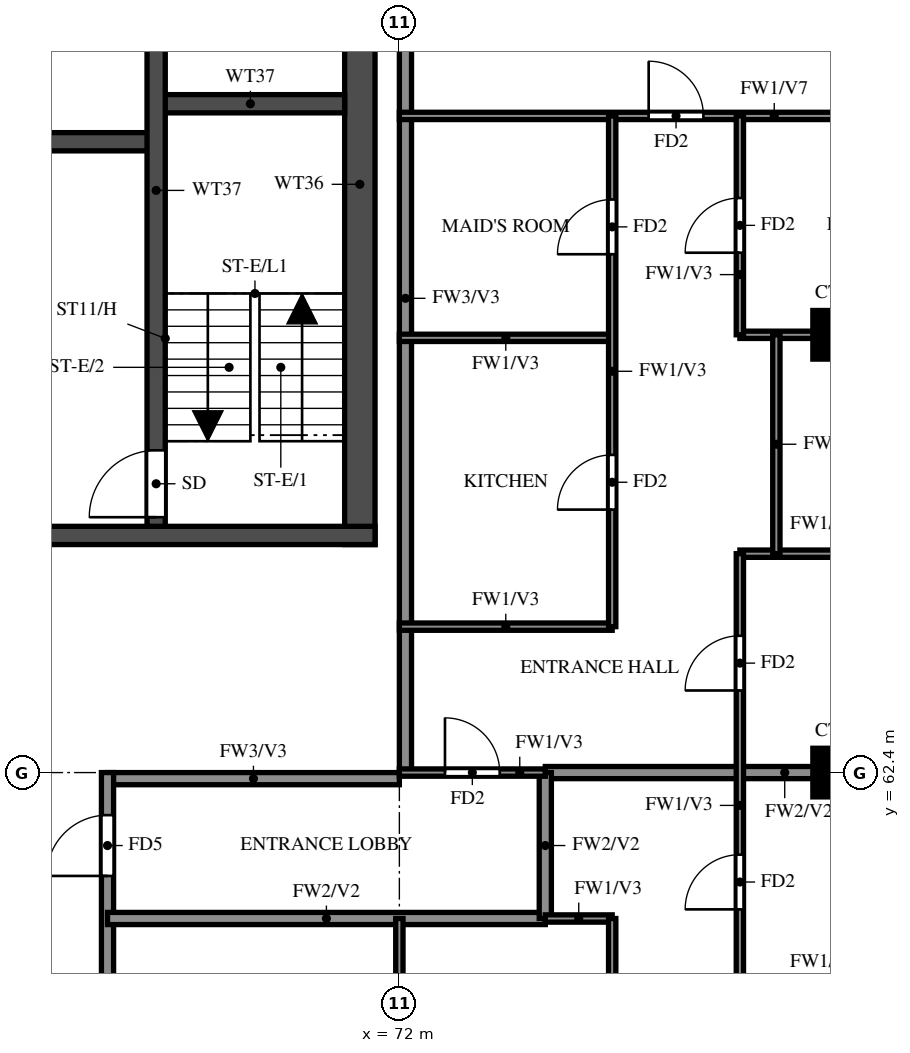
"""IFC4 building model, lengths in metres.
Left out: names, types, materials, properties, quantities, classifications, styles, units other than length and angle.
Written with IfcOpenShell. Run it as: python <this file> out.ifc"""

import sys

from ifc_helpers import new_model, si_unit, direction, frame, frame_2d, origin, origin_2d, place, context, subcontext, project, spatial, rectangle, extrude, source, transform, mapped, element, fill, save


model = new_model("IFC4")
c1 = context("Model", 3, precision=1e-05, world=origin(), true_north=direction((0.0, 1.0)))
c2 = subcontext(c1, "Body", "Model", "MODEL_VIEW")
j1 = project(units=[si_unit("LENGTHUNIT", "METRE"), si_unit("PLANEANGLEUNIT", "RADIAN")], contexts=[c1])
p1 = place(None, origin())
s1 = spatial("IfcSite", under=j1, at=p1, CompositionType="ELEMENT")
p2 = place(p1, origin())
s2 = spatial("IfcBuilding", under=s1, at=p2, CompositionType="ELEMENT")
p3 = place(p2, frame((0.0, 0.0, 239.5)))
s3 = spatial("IfcBuildingStorey", under=s2, at=p3, CompositionType="ELEMENT", Elevation=239.5)
m1 = source(origin(), c2, "Body", "SweptSolid", [
    extrude(rectangle(XDim=0.8, YDim=0.8, at=origin_2d()), origin(), (0.0, 0.0, 1.0), 3.22),
])
for number, where, z_axis, x_axis in (
    (1, (79.2, 62.4, 0.0), (0.0, 0.0, 1.0), (1.0, 0.0, 0.0)),
    (2, (79.2, 69.6, 0.0), (0.0, 0.0, 1.0), (1.0, 0.0, 0.0)),
):
    element("IfcColumn", number, at=place(p3, frame(where, z_axis=z_axis, x_axis=x_axis)), inside=s3, PredefinedType="COLUMN", context=c2, shape_type="MappedRepresentation", body=[
        mapped(m1, transform((0.0, 0.0, 0.0))),
    ])
p4 = place(p3, frame((71.35, 66.15, 0.0), z_axis=(0.0, 0.0, 1.0), x_axis=(0.0, 1.0, 0.0)))
e3 = element("IfcWall", 3, at=p4, inside=s3, PredefinedType="SHEAR", context=c2, shape_type="SweptSolid", body=[
    extrude(rectangle(XDim=11.85, YDim=0.5, at=frame_2d((5.925, 0.0))), origin(), (0.0, 0.0, 1.0), 3.22),
])
p5 = place(p3, frame((29.2, 66.3, 0.0), z_axis=(0.0, 0.0, 1.0), x_axis=(1.0, 0.0, 0.0)))
e4 = element("IfcWall", 4, at=p5, inside=s3, PredefinedType="SHEAR", context=c2, shape_type="SweptSolid", body=[
    extrude(rectangle(XDim=42.4, YDim=0.3, at=frame_2d((21.2, 0.0))), origin(), (0.0, 0.0, 1.0), 3.22),
])
p6 = place(p5, frame((1.425, 0.0, 0.0)))
e5 = element("IfcOpeningElement", 5, at=p6, cuts=e4, PredefinedType="OPENING", context=c2, shape_type="SweptSolid", body=[
    extrude(rectangle(XDim=1.1, YDim=2.1, at=frame_2d((0.55, 1.05))), frame((0.0, 0.16, 0.0), z_axis=(0.0, -1.0, 0.0), x_axis=(1.0, 0.0, 0.0)), (0.0, 0.0, 1.0), 0.32),
])
p7 = place(p5, frame((4.2, 0.0, 0.0)))
e6 = element("IfcOpeningElement", 6, at=p7, cuts=e4, PredefinedType="OPENING", context=c2, shape_type="SweptSolid", body=[
    extrude(rectangle(XDim=1.8, YDim=2.1, at=frame_2d((0.9, 1.05))), frame((0.0, 0.16, 0.0), z_axis=(0.0, -1.0, 0.0), x_axis=(1.0, 0.0, 0.0)), (0.0, 0.0, 1.0), 0.32),
])
p8 = place(p3, frame((32.8, 72.775, 0.0), z_axis=(0.0, 0.0, 1.0), x_axis=(1.0, 0.0, 0.0)))
e7 = element("IfcWall", 7, at=p8, inside=s3, PredefinedType="SHEAR", context=c2, shape_type="SweptSolid", body=[
    extrude(rectangle(XDim=35.2, YDim=0.3, at=frame_2d((17.6, 0.0))), origin(), (0.0, 0.0, 1.0), 3.22),
])
p9 = place(p8, frame((19.8, 0.0, 0.0)))
e8 = element("IfcOpeningElement", 8, at=p9, cuts=e7, PredefinedType="OPENING", context=c2, shape_type="SweptSolid", body=[
    extrude(rectangle(XDim=1.1, YDim=2.1, at=frame_2d((0.55, 1.05))), frame((0.0, 0.16, 0.0), z_axis=(0.0, -1.0, 0.0), x_axis=(1.0, 0.0, 0.0)), (0.0, 0.0, 1.0), 0.32),
])
p10 = place(p8, frame((27.725, 0.0, 0.0)))
e9 = element("IfcOpeningElement", 9, at=p10, cuts=e7, PredefinedType="OPENING", context=c2, shape_type="SweptSolid", body=[
    extrude(rectangle(XDim=1.1, YDim=2.1, at=frame_2d((0.55, 1.05))), frame((0.0, 0.16, 0.0), z_axis=(0.0, -1.0, 0.0), x_axis=(1.0, 0.0, 0.0)), (0.0, 0.0, 1.0), 0.32),
])
p11 = place(p8, frame((30.325, 0.0, 0.0)))
e10 = element("IfcOpeningElement", 10, at=p11, cuts=e7, PredefinedType="OPENING", context=c2, shape_type="SweptSolid", body=[
    extrude(rectangle(XDim=1.1, YDim=2.1, at=frame_2d((0.55, 1.05))), frame((0.0, 0.16, 0.0), z_axis=(0.0, -1.0, 0.0), x_axis=(1.0, 0.0, 0.0)), (0.0, 0.0, 1.0), 0.32),
])
p12 = place(p8, frame((3.825, 0.0, 0.0)))
e11 = element("IfcOpeningElement", 11, at=p12, cuts=e7, PredefinedType="OPENING", context=c2, shape_type="SweptSolid", body=[
    extrude(rectangle(XDim=1.1, YDim=2.1, at=frame_2d((0.55, 1.05))), frame((0.0, 0.16, 0.0), z_axis=(0.0, -1.0, 0.0), x_axis=(1.0, 0.0, 0.0)), (0.0, 0.0, 1.0), 0.32),
])
p13 = place(p8, frame((6.575, 0.0, 0.0)))
e12 = element("IfcOpeningElement", 12, at=p13, cuts=e7, PredefinedType="OPENING", context=c2, shape_type="SweptSolid", body=[
    extrude(rectangle(XDim=1.1, YDim=2.1, at=frame_2d((0.55, 1.05))), frame((0.0, 0.16, 0.0), z_axis=(0.0, -1.0, 0.0), x_axis=(1.0, 0.0, 0.0)), (0.0, 0.0, 1.0), 0.32),
])
p14 = place(p8, frame((9.325, 0.0, 0.0)))
e13 = element("IfcOpeningElement", 13, at=p14, cuts=e7, PredefinedType="OPENING", context=c2, shape_type="SweptSolid", body=[
    extrude(rectangle(XDim=1.1, YDim=2.1, at=frame_2d((0.55, 1.05))), frame((0.0, 0.16, 0.0), z_axis=(0.0, -1.0, 0.0), x_axis=(1.0, 0.0, 0.0)), (0.0, 0.0, 1.0), 0.32),
])
p15 = place(p8, frame((12.075, 0.0, 0.0)))
e14 = element("IfcOpeningElement", 14, at=p15, cuts=e7, PredefinedType="OPENING", context=c2, shape_type="SweptSolid", body=[
    extrude(rectangle(XDim=1.1, YDim=2.1, at=frame_2d((0.55, 1.05))), frame((0.0, 0.16, 0.0), z_axis=(0.0, -1.0, 0.0), x_axis=(1.0, 0.0, 0.0)), (0.0, 0.0, 1.0), 0.32),
])
p16 = place(p8, frame((14.825, 0.0, 0.0)))
e15 = element("IfcOpeningElement", 15, at=p16, cuts=e7, PredefinedType="OPENING", context=c2, shape_type="SweptSolid", body=[
    extrude(rectangle(XDim=1.1, YDim=2.1, at=frame_2d((0.55, 1.05))), frame((0.0, 0.16, 0.0), z_axis=(0.0, -1.0, 0.0), x_axis=(1.0, 0.0, 0.0)), (0.0, 0.0, 1.0), 0.32),
])
p17 = place(p8, frame((17.575, 0.0, 0.0)))
e16 = element("IfcOpeningElement", 16, at=p17, cuts=e7, PredefinedType="OPENING", context=c2, shape_type="SweptSolid", body=[
    extrude(rectangle(XDim=1.1, YDim=2.1, at=frame_2d((0.55, 1.05))), frame((0.0, 0.16, 0.0), z_axis=(0.0, -1.0, 0.0), x_axis=(1.0, 0.0, 0.0)), (0.0, 0.0, 1.0), 0.32),
])
p18 = place(p8, frame((0.95, 0.0, 0.0)))
e17 = element("IfcOpeningElement", 17, at=p18, cuts=e7, PredefinedType="OPENING", context=c2, shape_type="SweptSolid", body=[
    extrude(rectangle(XDim=1.1, YDim=2.1, at=frame_2d((0.55, 1.05))), frame((0.0, 0.16, 0.0), z_axis=(0.0, -1.0, 0.0), x_axis=(1.0, 0.0, 0.0)), (0.0, 0.0, 1.0), 0.32),
])
p19 = place(p3, frame((68.0, 73.4, 0.0), z_axis=(0.0, 0.0, 1.0), x_axis=(1.0, 0.0, 0.0)))
e18 = element("IfcWall", 18, at=p19, inside=s3, PredefinedType="SHEAR", context=c2, shape_type="SweptSolid", body=[
    extrude(rectangle(XDim=3.1, YDim=0.3, at=frame_2d((1.55, 0.0))), origin(), (0.0, 0.0, 1.0), 3.22),
])
p20 = place(p3, frame((68.0, 66.45, 0.0), z_axis=(0.0, 0.0, 1.0), x_axis=(0.0, 1.0, 0.0)))
e19 = element("IfcWall", 19, at=p20, inside=s3, PredefinedType="SHEAR", context=c2, shape_type="SweptSolid", body=[
    extrude(rectangle(XDim=11.05, YDim=0.3, at=frame_2d((5.525, 0.0))), origin(), (0.0, 0.0, 1.0), 3.22),
])
p21 = place(p20, frame((0.15, 0.0, 0.0)))
e20 = element("IfcOpeningElement", 20, at=p21, cuts=e19, PredefinedType="OPENING", context=c2, shape_type="SweptSolid", body=[
    extrude(rectangle(XDim=1.1, YDim=2.1, at=frame_2d((0.55, 1.05))), frame((0.0, 0.16, 0.0), z_axis=(0.0, -1.0, 0.0), x_axis=(1.0, 0.0, 0.0)), (0.0, 0.0, 1.0), 0.32),
])
p22 = place(p3, frame((67.2, 62.3, 0.0), z_axis=(0.0, 0.0, 1.0), x_axis=(1.0, 0.0, 0.0)))
e21 = element("IfcWall", 21, at=p22, inside=s3, PredefinedType="SOLIDWALL", context=c2, shape_type="SweptSolid", body=[
    extrude(rectangle(XDim=4.8, YDim=0.2, at=frame_2d((2.4, 0.0))), origin(), (0.0, 0.0, 1.0), 3.22),
])
p23 = place(p3, frame((67.2, 45.6, 0.0), z_axis=(0.0, 0.0, 1.0), x_axis=(0.0, 1.0, 0.0)))
e22 = element("IfcWall", 22, at=p23, inside=s3, PredefinedType="SOLIDWALL", context=c2, shape_type="SweptSolid", body=[
    extrude(rectangle(XDim=16.8, YDim=0.2, at=frame_2d((8.4, 0.0))), origin(), (0.0, 0.0, 1.0), 3.22),
])
p24 = place(p23, frame((6.7, 0.0, 0.0)))
e23 = element("IfcOpeningElement", 23, at=p24, cuts=e22, PredefinedType="OPENING", context=c2, shape_type="SweptSolid", body=[
    extrude(rectangle(XDim=1.0, YDim=2.1, at=frame_2d((0.5, 1.05))), frame((0.0, 0.11, 0.0), z_axis=(0.0, -1.0, 0.0), x_axis=(1.0, 0.0, 0.0)), (0.0, 0.0, 1.0), 0.22),
])
p25 = place(p23, frame((15.1, 0.0, 0.0)))
e24 = element("IfcOpeningElement", 24, at=p25, cuts=e22, PredefinedType="OPENING", context=c2, shape_type="SweptSolid", body=[
    extrude(rectangle(XDim=1.0, YDim=2.1, at=frame_2d((0.5, 1.05))), frame((0.0, 0.11, 0.0), z_axis=(0.0, -1.0, 0.0), x_axis=(1.0, 0.0, 0.0)), (0.0, 0.0, 1.0), 0.22),
])
p26 = place(p23, frame((0.7, 0.0, 0.0)))
e25 = element("IfcOpeningElement", 25, at=p26, cuts=e22, PredefinedType="OPENING", context=c2, shape_type="SweptSolid", body=[
    extrude(rectangle(XDim=1.0, YDim=2.1, at=frame_2d((0.5, 1.05))), frame((0.0, 0.11, 0.0), z_axis=(0.0, -1.0, 0.0), x_axis=(1.0, 0.0, 0.0)), (0.0, 0.0, 1.0), 0.22),
])
p27 = place(p3, frame((72.1, 62.4, 0.0), z_axis=(0.0, 0.0, 1.0), x_axis=(0.0, 1.0, 0.0)))
e26 = element("IfcWall", 26, at=p27, inside=s3, PredefinedType="SOLIDWALL", context=c2, shape_type="SweptSolid", body=[
    extrude(rectangle(XDim=15.6, YDim=0.2, at=frame_2d((7.8, 0.0))), origin(), (0.0, 0.0, 1.0), 3.22),
])
p28 = place(p3, frame((67.2, 60.0, 0.0), z_axis=(0.0, 0.0, 1.0), x_axis=(1.0, 0.0, 0.0)))
e27 = element("IfcWall", 27, at=p28, inside=s3, PredefinedType="SOLIDWALL", context=c2, shape_type="SweptSolid", body=[
    extrude(rectangle(XDim=7.2, YDim=0.2, at=frame_2d((3.6, 0.0))), origin(), (0.0, 0.0, 1.0), 3.22),
])
p29 = place(p3, frame((74.4, 62.4, 0.0), z_axis=(0.0, 0.0, 1.0), x_axis=(1.0, 0.0, 0.0)))
e28 = element("IfcWall", 28, at=p29, inside=s3, PredefinedType="SOLIDWALL", context=c2, shape_type="SweptSolid", body=[
    extrude(rectangle(XDim=7.875, YDim=0.2, at=frame_2d((3.938, 0.0))), origin(), (0.0, 0.0, 1.0), 3.22),
])
p30 = place(p3, frame((74.4, 60.0, 0.0), z_axis=(0.0, 0.0, 1.0), x_axis=(0.0, 1.0, 0.0)))
e29 = element("IfcWall", 29, at=p30, inside=s3, PredefinedType="SOLIDWALL", context=c2, shape_type="SweptSolid", body=[
    extrude(rectangle(XDim=2.4, YDim=0.2, at=frame_2d((1.2, 0.0))), origin(), (0.0, 0.0, 1.0), 3.22),
])
p31 = place(p3, frame((74.4, 60.0, 0.0), z_axis=(0.0, 0.0, 1.0), x_axis=(1.0, 0.0, 0.0)))
e30 = element("IfcWall", 30, at=p31, inside=s3, PredefinedType="PARTITIONING", context=c2, shape_type="SweptSolid", body=[
    extrude(rectangle(XDim=1.1, YDim=0.12, at=frame_2d((0.55, 0.0))), origin(), (0.0, 0.0, 1.0), 3.22),
])
p32 = place(p3, frame((72.0, 62.4, 0.0), z_axis=(0.0, 0.0, 1.0), x_axis=(1.0, 0.0, 0.0)))
e31 = element("IfcWall", 31, at=p32, inside=s3, PredefinedType="PARTITIONING", context=c2, shape_type="SweptSolid", body=[
    extrude(rectangle(XDim=2.4, YDim=0.12, at=frame_2d((1.2, 0.0))), origin(), (0.0, 0.0, 1.0), 3.22),
])
p33 = place(p32, frame((0.75, 0.0, 0.0)))
e32 = element("IfcOpeningElement", 32, at=p33, cuts=e31, PredefinedType="OPENING", context=c2, shape_type="SweptSolid", body=[
    extrude(rectangle(XDim=0.9, YDim=2.1, at=frame_2d((0.45, 1.05))), frame((0.0, 0.07, 0.0), z_axis=(0.0, -1.0, 0.0), x_axis=(1.0, 0.0, 0.0)), (0.0, 0.0, 1.0), 0.14),
])
p34 = place(p3, frame((72.0, 64.8, 0.0), z_axis=(0.0, 0.0, 1.0), x_axis=(1.0, 0.0, 0.0)))
e33 = element("IfcWall", 33, at=p34, inside=s3, PredefinedType="PARTITIONING", context=c2, shape_type="SweptSolid", body=[
    extrude(rectangle(XDim=3.5, YDim=0.12, at=frame_2d((1.75, 0.0))), origin(), (0.0, 0.0, 1.0), 3.22),
])
p35 = place(p3, frame((77.6, 66.0, 0.0), z_axis=(0.0, 0.0, 1.0), x_axis=(1.0, 0.0, 0.0)))
e34 = element("IfcWall", 34, at=p35, inside=s3, PredefinedType="PARTITIONING", context=c2, shape_type="SweptSolid", body=[
    extrude(rectangle(XDim=4.675, YDim=0.12, at=frame_2d((2.337, 0.0))), origin(), (0.0, 0.0, 1.0), 2.32),
])
p36 = place(p35, frame((2.238, 0.0, 0.0)))
e35 = element("IfcOpeningElement", 35, at=p36, cuts=e34, PredefinedType="OPENING", context=c2, shape_type="SweptSolid", body=[
    extrude(rectangle(XDim=0.8, YDim=2.1, at=frame_2d((0.4, 1.05))), frame((0.0, 0.07, 0.0), z_axis=(0.0, -1.0, 0.0), x_axis=(1.0, 0.0, 0.0)), (0.0, 0.0, 1.0), 0.14),
])
p37 = place(p3, frame((72.0, 69.55, 0.0), z_axis=(0.0, 0.0, 1.0), x_axis=(1.0, 0.0, 0.0)))
e36 = element("IfcWall", 36, at=p37, inside=s3, PredefinedType="PARTITIONING", context=c2, shape_type="SweptSolid", body=[
    extrude(rectangle(XDim=3.5, YDim=0.12, at=frame_2d((1.75, 0.0))), origin(), (0.0, 0.0, 1.0), 3.22),
])
p38 = place(p3, frame((77.6, 69.6, 0.0), z_axis=(0.0, 0.0, 1.0), x_axis=(1.0, 0.0, 0.0)))
e37 = element("IfcWall", 37, at=p38, inside=s3, PredefinedType="PARTITIONING", context=c2, shape_type="SweptSolid", body=[
    extrude(rectangle(XDim=4.675, YDim=0.12, at=frame_2d((2.337, 0.0))), origin(), (0.0, 0.0, 1.0), 3.22),
])
p39 = place(p3, frame((72.0, 73.2, 0.0), z_axis=(0.0, 0.0, 1.0), x_axis=(1.0, 0.0, 0.0)))
e38 = element("IfcWall", 38, at=p39, inside=s3, PredefinedType="PARTITIONING", context=c2, shape_type="SweptSolid", body=[
    extrude(rectangle(XDim=10.275, YDim=0.12, at=frame_2d((5.137, 0.0))), origin(), (0.0, 0.0, 1.0), 2.32),
])
p40 = place(p39, frame((4.1, 0.0, 0.0)))
e39 = element("IfcOpeningElement", 39, at=p40, cuts=e38, PredefinedType="OPENING", context=c2, shape_type="SweptSolid", body=[
    extrude(rectangle(XDim=0.9, YDim=2.1, at=frame_2d((0.45, 1.05))), frame((0.0, 0.07, 0.0), z_axis=(0.0, -1.0, 0.0), x_axis=(1.0, 0.0, 0.0)), (0.0, 0.0, 1.0), 0.14),
])
p41 = place(p3, frame((72.0, 54.0, 0.0), z_axis=(0.0, 0.0, 1.0), x_axis=(0.0, 1.0, 0.0)))
e40 = element("IfcWall", 40, at=p41, inside=s3, PredefinedType="PARTITIONING", context=c2, shape_type="SweptSolid", body=[
    extrude(rectangle(XDim=6.0, YDim=0.12, at=frame_2d((3.0, 0.0))), origin(), (0.0, 0.0, 1.0), 3.22),
])
p42 = place(p3, frame((75.5, 54.0, 0.0), z_axis=(0.0, 0.0, 1.0), x_axis=(0.0, 1.0, 0.0)))
e41 = element("IfcWall", 41, at=p42, inside=s3, PredefinedType="PARTITIONING", context=c2, shape_type="SweptSolid", body=[
    extrude(rectangle(XDim=6.0, YDim=0.12, at=frame_2d((3.0, 0.0))), origin(), (0.0, 0.0, 1.0), 3.22),
])
p43 = place(p42, frame((3.7, 0.0, 0.0)))
e42 = element("IfcOpeningElement", 42, at=p43, cuts=e41, PredefinedType="OPENING", context=c2, shape_type="SweptSolid", body=[
    extrude(rectangle(XDim=0.8, YDim=2.1, at=frame_2d((0.4, 1.05))), frame((0.0, 0.07, 0.0), z_axis=(0.0, -1.0, 0.0), x_axis=(1.0, 0.0, 0.0)), (0.0, 0.0, 1.0), 0.14),
])
p44 = place(p3, frame((75.5, 64.8, 0.0), z_axis=(0.0, 0.0, 1.0), x_axis=(0.0, 1.0, 0.0)))
e43 = element("IfcWall", 43, at=p44, inside=s3, PredefinedType="PARTITIONING", context=c2, shape_type="SweptSolid", body=[
    extrude(rectangle(XDim=8.4, YDim=0.12, at=frame_2d((4.2, 0.0))), origin(), (0.0, 0.0, 1.0), 3.22),
])
p45 = place(p44, frame((1.925, 0.0, 0.0)))
e44 = element("IfcOpeningElement", 44, at=p45, cuts=e43, PredefinedType="OPENING", context=c2, shape_type="SweptSolid", body=[
    extrude(rectangle(XDim=0.9, YDim=2.1, at=frame_2d((0.45, 1.05))), frame((0.0, 0.07, 0.0), z_axis=(0.0, -1.0, 0.0), x_axis=(1.0, 0.0, 0.0)), (0.0, 0.0, 1.0), 0.14),
])
p46 = place(p44, frame((6.125, 0.0, 0.0)))
e45 = element("IfcOpeningElement", 45, at=p46, cuts=e43, PredefinedType="OPENING", context=c2, shape_type="SweptSolid", body=[
    extrude(rectangle(XDim=0.9, YDim=2.1, at=frame_2d((0.45, 1.05))), frame((0.0, 0.07, 0.0), z_axis=(0.0, -1.0, 0.0), x_axis=(1.0, 0.0, 0.0)), (0.0, 0.0, 1.0), 0.14),
])
p47 = place(p3, frame((77.6, 58.8, 0.0), z_axis=(0.0, 0.0, 1.0), x_axis=(0.0, 1.0, 0.0)))
e46 = element("IfcWall", 46, at=p47, inside=s3, PredefinedType="PARTITIONING", context=c2, shape_type="SweptSolid", body=[
    extrude(rectangle(XDim=7.2, YDim=0.12, at=frame_2d((3.6, 0.0))), origin(), (0.0, 0.0, 1.0), 3.22),
])
p48 = place(p47, frame((1.35, 0.0, 0.0)))
e47 = element("IfcOpeningElement", 47, at=p48, cuts=e46, PredefinedType="OPENING", context=c2, shape_type="SweptSolid", body=[
    extrude(rectangle(XDim=0.9, YDim=2.1, at=frame_2d((0.45, 1.05))), frame((0.0, 0.07, 0.0), z_axis=(0.0, -1.0, 0.0), x_axis=(1.0, 0.0, 0.0)), (0.0, 0.0, 1.0), 0.14),
])
p49 = place(p47, frame((4.95, 0.0, 0.0)))
e48 = element("IfcOpeningElement", 48, at=p49, cuts=e46, PredefinedType="OPENING", context=c2, shape_type="SweptSolid", body=[
    extrude(rectangle(XDim=0.9, YDim=2.1, at=frame_2d((0.45, 1.05))), frame((0.0, 0.07, 0.0), z_axis=(0.0, -1.0, 0.0), x_axis=(1.0, 0.0, 0.0)), (0.0, 0.0, 1.0), 0.14),
])
p50 = place(p3, frame((77.6, 69.6, 0.0), z_axis=(0.0, 0.0, 1.0), x_axis=(0.0, 1.0, 0.0)))
e49 = element("IfcWall", 49, at=p50, inside=s3, PredefinedType="PARTITIONING", context=c2, shape_type="SweptSolid", body=[
    extrude(rectangle(XDim=3.6, YDim=0.12, at=frame_2d((1.8, 0.0))), origin(), (0.0, 0.0, 1.0), 3.22),
])
p51 = place(p50, frame((1.35, 0.0, 0.0)))
e50 = element("IfcOpeningElement", 50, at=p51, cuts=e49, PredefinedType="OPENING", context=c2, shape_type="SweptSolid", body=[
    extrude(rectangle(XDim=0.9, YDim=2.1, at=frame_2d((0.45, 1.05))), frame((0.0, 0.07, 0.0), z_axis=(0.0, -1.0, 0.0), x_axis=(1.0, 0.0, 0.0)), (0.0, 0.0, 1.0), 0.14),
])
p52 = place(p3, frame((78.2, 66.0, 0.0), z_axis=(0.0, 0.0, 1.0), x_axis=(0.0, 1.0, 0.0)))
e51 = element("IfcWall", 51, at=p52, inside=s3, PredefinedType="PARTITIONING", context=c2, shape_type="SweptSolid", body=[
    extrude(rectangle(XDim=3.6, YDim=0.12, at=frame_2d((1.8, 0.0))), origin(), (0.0, 0.0, 1.0), 3.22),
])
p53 = place(p21, origin())
e52 = element("IfcDoor", 52, at=p53, inside=s3, OperationType="SINGLE_SWING_RIGHT", PredefinedType="DOOR", context=c2, shape_type="SweptSolid", body=[
    extrude(rectangle(XDim=1.1, YDim=2.1, at=frame_2d((0.55, 1.05))), frame((0.0, 0.025, 0.0), z_axis=(0.0, -1.0, 0.0), x_axis=(1.0, 0.0, 0.0)), (0.0, 0.0, 1.0), 0.05),
])
fill(e20, e52)
p54 = place(p48, origin())
e53 = element("IfcDoor", 53, at=p54, inside=s3, OperationType="SINGLE_SWING_LEFT", PredefinedType="DOOR", context=c2, shape_type="SweptSolid", body=[
    extrude(rectangle(XDim=0.9, YDim=2.1, at=frame_2d((0.45, 1.05))), frame((0.0, 0.025, 0.0), z_axis=(0.0, -1.0, 0.0), x_axis=(1.0, 0.0, 0.0)), (0.0, 0.0, 1.0), 0.05),
])
fill(e47, e53)
p55 = place(p33, origin())
e54 = element("IfcDoor", 54, at=p55, inside=s3, OperationType="SINGLE_SWING_RIGHT", PredefinedType="DOOR", context=c2, shape_type="SweptSolid", body=[
    extrude(rectangle(XDim=0.9, YDim=2.1, at=frame_2d((0.45, 1.05))), frame((0.0, 0.025, 0.0), z_axis=(0.0, -1.0, 0.0), x_axis=(1.0, 0.0, 0.0)), (0.0, 0.0, 1.0), 0.05),
])
fill(e32, e54)
p56 = place(p25, origin())
e55 = element("IfcDoor", 55, at=p56, inside=s3, OperationType="SINGLE_SWING_LEFT", PredefinedType="DOOR", context=c2, shape_type="SweptSolid", body=[
    extrude(rectangle(XDim=1.0, YDim=2.1, at=frame_2d((0.5, 1.05))), frame((0.0, 0.025, 0.0), z_axis=(0.0, -1.0, 0.0), x_axis=(1.0, 0.0, 0.0)), (0.0, 0.0, 1.0), 0.05),
])
fill(e24, e55)
p57 = place(p49, origin())
e56 = element("IfcDoor", 56, at=p57, inside=s3, OperationType="SINGLE_SWING_LEFT", PredefinedType="DOOR", context=c2, shape_type="SweptSolid", body=[
    extrude(rectangle(XDim=0.9, YDim=2.1, at=frame_2d((0.45, 1.05))), frame((0.0, 0.025, 0.0), z_axis=(0.0, -1.0, 0.0), x_axis=(1.0, 0.0, 0.0)), (0.0, 0.0, 1.0), 0.05),
])
fill(e48, e56)
p58 = place(p51, origin())
e57 = element("IfcDoor", 57, at=p58, inside=s3, OperationType="SINGLE_SWING_LEFT", PredefinedType="DOOR", context=c2, shape_type="SweptSolid", body=[
    extrude(rectangle(XDim=0.9, YDim=2.1, at=frame_2d((0.45, 1.05))), frame((0.0, 0.025, 0.0), z_axis=(0.0, -1.0, 0.0), x_axis=(1.0, 0.0, 0.0)), (0.0, 0.0, 1.0), 0.05),
])
fill(e50, e57)
p59 = place(p40, origin())
e58 = element("IfcDoor", 58, at=p59, inside=s3, OperationType="SINGLE_SWING_LEFT", PredefinedType="DOOR", context=c2, shape_type="SweptSolid", body=[
    extrude(rectangle(XDim=0.9, YDim=2.1, at=frame_2d((0.45, 1.05))), frame((0.0, 0.025, 0.0), z_axis=(0.0, -1.0, 0.0), x_axis=(1.0, 0.0, 0.0)), (0.0, 0.0, 1.0), 0.05),
])
fill(e39, e58)
p60 = place(p45, origin())
e59 = element("IfcDoor", 59, at=p60, inside=s3, OperationType="SINGLE_SWING_RIGHT", PredefinedType="DOOR", context=c2, shape_type="SweptSolid", body=[
    extrude(rectangle(XDim=0.9, YDim=2.1, at=frame_2d((0.45, 1.05))), frame((0.0, 0.025, 0.0), z_axis=(0.0, -1.0, 0.0), x_axis=(1.0, 0.0, 0.0)), (0.0, 0.0, 1.0), 0.05),
])
fill(e44, e59)
p61 = place(p46, origin())
e60 = element("IfcDoor", 60, at=p61, inside=s3, OperationType="SINGLE_SWING_LEFT", PredefinedType="DOOR", context=c2, shape_type="SweptSolid", body=[
    extrude(rectangle(XDim=0.9, YDim=2.1, at=frame_2d((0.45, 1.05))), frame((0.0, 0.025, 0.0), z_axis=(0.0, -1.0, 0.0), x_axis=(1.0, 0.0, 0.0)), (0.0, 0.0, 1.0), 0.05),
])
fill(e45, e60)
save(model, sys.argv[1])
